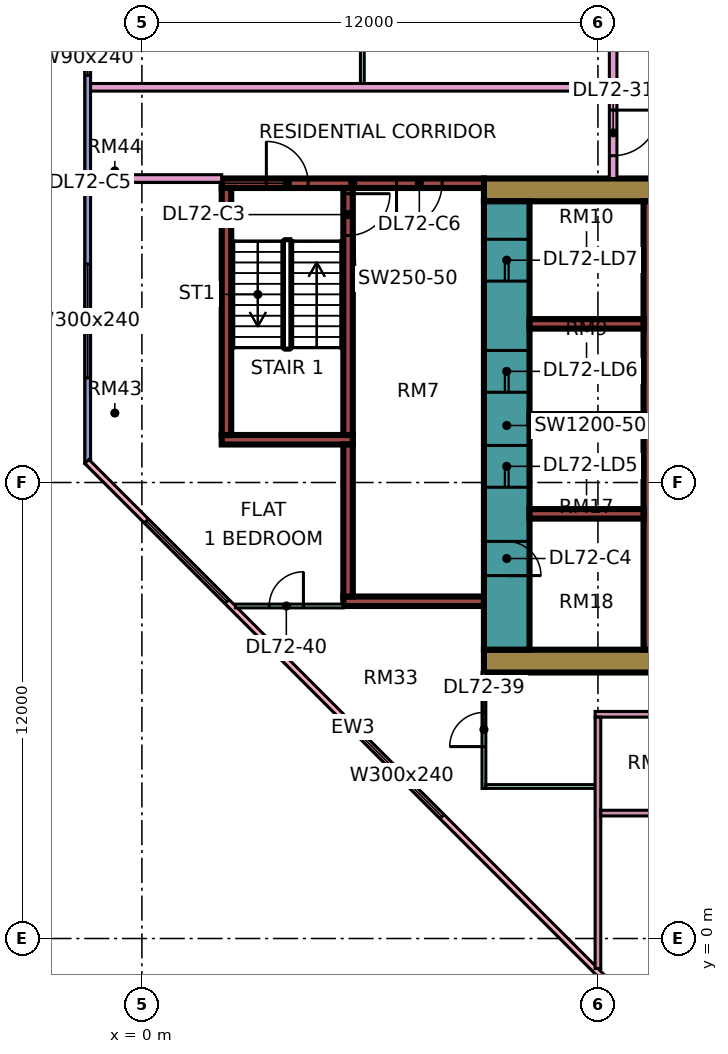
"""IFC4 building model, lengths in metres.
Left out: names, types, materials, properties, quantities, classifications, styles, units other than length and angle.
Written with IfcOpenShell. Run it as: python <this file> out.ifc"""

import sys

from ifc_helpers import new_model, si_unit, direction, frame, frame_2d, origin, place, context, subcontext, project, spatial, rectangle, extrude, element, fill, save


model = new_model("IFC4")
c1 = context("Model", 3, precision=1e-05, world=origin(), true_north=direction((0.0, 1.0)))
c2 = subcontext(c1, "Body", "Model", "MODEL_VIEW")
j1 = project(units=[si_unit("LENGTHUNIT", "METRE"), si_unit("PLANEANGLEUNIT", "RADIAN")], contexts=[c1])
p1 = place(None, origin())
s1 = spatial("IfcSite", under=j1, at=p1, CompositionType="ELEMENT")
p2 = place(p1, origin())
s2 = spatial("IfcBuilding", under=s1, at=p2, CompositionType="ELEMENT")
p3 = place(p2, frame((0.0, 0.0, 307.15)))
s3 = spatial("IfcBuildingStorey", under=s2, at=p3, CompositionType="ELEMENT", Elevation=307.15)
p4 = place(p3, frame((9.0, 7.3, 0.0), z_axis=(0.0, 0.0, 1.0), x_axis=(1.0, 0.0, 0.0)))
e1 = element("IfcWall", 1, at=p4, inside=s3, PredefinedType="SHEAR", context=c2, shape_type="SweptSolid", body=[
    extrude(rectangle(XDim=25.0, YDim=0.6, at=frame_2d((12.5, 0.0))), origin(), (0.0, 0.0, 1.0), 3.75),
])
p5 = place(p3, frame((9.0, 19.7, 0.0), z_axis=(0.0, 0.0, 1.0), x_axis=(1.0, 0.0, 0.0)))
e2 = element("IfcWall", 2, at=p5, inside=s3, PredefinedType="SHEAR", context=c2, shape_type="SweptSolid", body=[
    extrude(rectangle(XDim=25.0, YDim=0.6, at=frame_2d((12.5, 0.0))), origin(), (0.0, 0.0, 1.0), 3.75),
])
p6 = place(p5, frame((19.1, 0.0, 0.0)))
e3 = element("IfcOpeningElement", 3, at=p6, cuts=e2, PredefinedType="OPENING", context=c2, shape_type="SweptSolid", body=[
    extrude(rectangle(XDim=1.8, YDim=2.4, at=frame_2d((0.9, 1.2))), frame((0.0, 0.31, 0.0), z_axis=(0.0, -1.0, 0.0), x_axis=(1.0, 0.0, 0.0)), (0.0, 0.0, 1.0), 0.62),
])
p7 = place(p3, frame((9.6, 7.6, 0.0), z_axis=(0.0, 0.0, 1.0), x_axis=(0.0, 1.0, 0.0)))
e4 = element("IfcWall", 4, at=p7, inside=s3, PredefinedType="SHEAR", context=c2, shape_type="SweptSolid", body=[
    extrude(rectangle(XDim=11.8, YDim=1.2, at=frame_2d((5.9, 0.0))), origin(), (0.0, 0.0, 1.0), 3.75),
])
p8 = place(p7, frame((4.275, 0.0, 0.0)))
e5 = element("IfcOpeningElement", 5, at=p8, cuts=e4, PredefinedType="OPENING", context=c2, shape_type="SweptSolid", body=[
    extrude(rectangle(XDim=1.1, YDim=2.2, at=frame_2d((0.55, 1.1))), frame((0.0, 0.61, 0.0), z_axis=(0.0, -1.0, 0.0), x_axis=(1.0, 0.0, 0.0)), (0.0, 0.0, 1.0), 1.22),
])
p9 = place(p7, frame((6.775, 0.0, 0.0)))
e6 = element("IfcOpeningElement", 6, at=p9, cuts=e4, PredefinedType="OPENING", context=c2, shape_type="SweptSolid", body=[
    extrude(rectangle(XDim=1.1, YDim=2.2, at=frame_2d((0.55, 1.1))), frame((0.0, 0.61, 0.0), z_axis=(0.0, -1.0, 0.0), x_axis=(1.0, 0.0, 0.0)), (0.0, 0.0, 1.0), 1.22),
])
p10 = place(p7, frame((9.7, 0.0, 0.0)))
e7 = element("IfcOpeningElement", 7, at=p10, cuts=e4, PredefinedType="OPENING", context=c2, shape_type="SweptSolid", body=[
    extrude(rectangle(XDim=1.1, YDim=2.2, at=frame_2d((0.55, 1.1))), frame((0.0, 0.61, 0.0), z_axis=(0.0, -1.0, 0.0), x_axis=(1.0, 0.0, 0.0)), (0.0, 0.0, 1.0), 1.22),
])
p11 = place(p7, frame((1.95, 0.0, 0.0)))
e8 = element("IfcOpeningElement", 8, at=p11, cuts=e4, PredefinedType="OPENING", context=c2, shape_type="SweptSolid", body=[
    extrude(rectangle(XDim=0.9, YDim=2.1, at=frame_2d((0.45, 1.05))), frame((0.0, 0.61, 0.0), z_axis=(0.0, -1.0, 0.0), x_axis=(1.0, 0.0, 0.0)), (0.0, 0.0, 1.0), 1.22),
])
p12 = place(p3, frame((13.325, 7.6, 0.0), z_axis=(0.0, 0.0, 1.0), x_axis=(0.0, 1.0, 0.0)))
e9 = element("IfcWall", 9, at=p12, inside=s3, PredefinedType="SHEAR", context=c2, shape_type="SweptSolid", body=[
    extrude(rectangle(XDim=11.8, YDim=0.25, at=frame_2d((5.9, 0.0))), origin(), (0.0, 0.0, 1.0), 3.75),
])
for number, where, z_axis, x_axis in (
    (10, (10.2, 11.175, 0.0), (0.0, 0.0, 1.0), (1.0, 0.0, 0.0)),
    (11, (10.2, 13.675, 0.0), (0.0, 0.0, 1.0), (1.0, 0.0, 0.0)),
    (12, (10.2, 16.175, 0.0), (0.0, 0.0, 1.0), (1.0, 0.0, 0.0)),
):
    element("IfcWall", number, at=place(p3, frame(where, z_axis=z_axis, x_axis=x_axis)), inside=s3, PredefinedType="SHEAR", context=c2, shape_type="SweptSolid", body=[
        extrude(rectangle(XDim=3.0, YDim=0.25, at=frame_2d((1.5, 0.0))), origin(), (0.0, 0.0, 1.0), 3.75),
    ])
p13 = place(p3, frame((2.1, 19.875, 0.0), z_axis=(0.0, 0.0, 1.0), x_axis=(1.0, 0.0, 0.0)))
e13 = element("IfcWall", 13, at=p13, inside=s3, PredefinedType="SHEAR", context=c2, shape_type="SweptSolid", body=[
    extrude(rectangle(XDim=6.9, YDim=0.25, at=frame_2d((3.45, 0.0))), origin(), (0.0, 0.0, 1.0), 3.75),
])
p14 = place(p13, frame((1.175, 0.0, 0.0)))
e14 = element("IfcOpeningElement", 14, at=p14, cuts=e13, PredefinedType="OPENING", context=c2, shape_type="SweptSolid", body=[
    extrude(rectangle(XDim=1.1, YDim=2.2, at=frame_2d((0.55, 1.1))), frame((0.0, 0.135, 0.0), z_axis=(0.0, -1.0, 0.0), x_axis=(1.0, 0.0, 0.0)), (0.0, 0.0, 1.0), 0.27),
])
p15 = place(p13, frame((4.6, 0.0, 0.0)))
e15 = element("IfcOpeningElement", 15, at=p15, cuts=e13, PredefinedType="OPENING", context=c2, shape_type="SweptSolid", body=[
    extrude(rectangle(XDim=1.2, YDim=2.2, at=frame_2d((0.6, 1.1))), frame((0.0, 0.135, 0.0), z_axis=(0.0, -1.0, 0.0), x_axis=(1.0, 0.0, 0.0)), (0.0, 0.0, 1.0), 0.27),
])
p16 = place(p3, frame((2.1, 13.125, 0.0), z_axis=(0.0, 0.0, 1.0), x_axis=(1.0, 0.0, 0.0)))
e16 = element("IfcWall", 16, at=p16, inside=s3, PredefinedType="SHEAR", context=c2, shape_type="SweptSolid", body=[
    extrude(rectangle(XDim=3.45, YDim=0.25, at=frame_2d((1.725, 0.0))), origin(), (0.0, 0.0, 1.0), 3.75),
])
p17 = place(p3, frame((2.225, 13.25, 0.0), z_axis=(0.0, 0.0, 1.0), x_axis=(0.0, 1.0, 0.0)))
e17 = element("IfcWall", 17, at=p17, inside=s3, PredefinedType="SHEAR", context=c2, shape_type="SweptSolid", body=[
    extrude(rectangle(XDim=6.5, YDim=0.25, at=frame_2d((3.25, 0.0))), origin(), (0.0, 0.0, 1.0), 3.75),
])
p18 = place(p3, frame((5.425, 13.25, 0.0), z_axis=(0.0, 0.0, 1.0), x_axis=(0.0, 1.0, 0.0)))
e18 = element("IfcWall", 18, at=p18, inside=s3, PredefinedType="SHEAR", context=c2, shape_type="SweptSolid", body=[
    extrude(rectangle(XDim=6.5, YDim=0.25, at=frame_2d((3.25, 0.0))), origin(), (0.0, 0.0, 1.0), 3.75),
])
p19 = place(p18, frame((5.25, 0.0, 0.0)))
e19 = element("IfcOpeningElement", 19, at=p19, cuts=e18, PredefinedType="OPENING", context=c2, shape_type="SweptSolid", body=[
    extrude(rectangle(XDim=1.1, YDim=2.2, at=frame_2d((0.55, 1.1))), frame((0.0, 0.135, 0.0), z_axis=(0.0, -1.0, 0.0), x_axis=(1.0, 0.0, 0.0)), (0.0, 0.0, 1.0), 0.27),
])
p20 = place(p3, frame((5.3, 8.875, 0.0), z_axis=(0.0, 0.0, 1.0), x_axis=(1.0, 0.0, 0.0)))
e20 = element("IfcWall", 20, at=p20, inside=s3, PredefinedType="SHEAR", context=c2, shape_type="SweptSolid", body=[
    extrude(rectangle(XDim=3.7, YDim=0.25, at=frame_2d((1.85, 0.0))), origin(), (0.0, 0.0, 1.0), 3.75),
])
p21 = place(p3, frame((5.425, 9.0, 0.0), z_axis=(0.0, 0.0, 1.0), x_axis=(0.0, 1.0, 0.0)))
e21 = element("IfcWall", 21, at=p21, inside=s3, PredefinedType="SHEAR", context=c2, shape_type="SweptSolid", body=[
    extrude(rectangle(XDim=4.0, YDim=0.25, at=frame_2d((2.0, 0.0))), origin(), (0.0, 0.0, 1.0), 3.75),
])
p22 = place(p3, frame((-1.425, 23.925, 0.0), z_axis=(0.0, 0.0, 1.0), x_axis=(0.0, -1.0, 0.0)))
e22 = element("IfcWall", 22, at=p22, inside=s3, PredefinedType="SOLIDWALL", context=c2, shape_type="SweptSolid", body=[
    extrude(rectangle(XDim=11.425, YDim=0.15, at=frame_2d((5.712, 0.0))), origin(), (0.0, 0.0, 1.0), 3.35),
])
p23 = place(p22, frame((0.312, 0.0, 0.45)))
e23 = element("IfcOpeningElement", 23, at=p23, cuts=e22, PredefinedType="OPENING", context=c2, shape_type="SweptSolid", body=[
    extrude(rectangle(XDim=0.9, YDim=2.4, at=frame_2d((0.45, 1.2))), frame((0.0, 0.085, 0.0), z_axis=(0.0, -1.0, 0.0), x_axis=(1.0, 0.0, 0.0)), (0.0, 0.0, 1.0), 0.17),
])
p24 = place(p22, frame((6.175, 0.0, 0.45)))
e24 = element("IfcOpeningElement", 24, at=p24, cuts=e22, PredefinedType="OPENING", context=c2, shape_type="SweptSolid", body=[
    extrude(rectangle(XDim=3.0, YDim=2.4, at=frame_2d((1.5, 1.2))), frame((0.0, 0.085, 0.0), z_axis=(0.0, -1.0, 0.0), x_axis=(1.0, 0.0, 0.0)), (0.0, 0.0, 1.0), 0.17),
])
p25 = place(p3, frame((-1.447, 12.553, 0.0), z_axis=(0.0, 0.0, 1.0), x_axis=(0.707106781187, -0.707106781187, 0.0)))
e25 = element("IfcWall", 25, at=p25, inside=s3, PredefinedType="SOLIDWALL", context=c2, shape_type="SweptSolid", body=[
    extrude(rectangle(XDim=19.799, YDim=0.15, at=frame_2d((9.899, 0.0))), origin(), (0.0, 0.0, 1.0), 3.35),
])
p26 = place(p25, frame((2.212, 0.0, 0.45)))
e26 = element("IfcOpeningElement", 26, at=p26, cuts=e25, PredefinedType="OPENING", context=c2, shape_type="SweptSolid", body=[
    extrude(rectangle(XDim=3.0, YDim=2.4, at=frame_2d((1.5, 1.2))), frame((0.0, 0.085, 0.0), z_axis=(0.0, -1.0, 0.0), x_axis=(1.0, 0.0, 0.0)), (0.0, 0.0, 1.0), 0.17),
])
p27 = place(p25, frame((10.216, 0.0, 0.45)))
e27 = element("IfcOpeningElement", 27, at=p27, cuts=e25, PredefinedType="OPENING", context=c2, shape_type="SweptSolid", body=[
    extrude(rectangle(XDim=3.0, YDim=2.4, at=frame_2d((1.5, 1.2))), frame((0.0, 0.085, 0.0), z_axis=(0.0, -1.0, 0.0), x_axis=(1.0, 0.0, 0.0)), (0.0, 0.0, 1.0), 0.17),
])
p28 = place(p3, frame((-1.35, 20.0, 0.0), z_axis=(0.0, 0.0, 1.0), x_axis=(1.0, 0.0, 0.0)))
e28 = element("IfcWall", 28, at=p28, inside=s3, PredefinedType="PARTITIONING", context=c2, shape_type="SweptSolid", body=[
    extrude(rectangle(XDim=3.45, YDim=0.2, at=frame_2d((1.725, 0.0))), origin(), (0.0, 0.0, 1.0), 3.35),
])
p29 = place(p3, frame((-1.35, 22.4, 0.0), z_axis=(0.0, 0.0, 1.0), x_axis=(1.0, 0.0, 0.0)))
e29 = element("IfcWall", 29, at=p29, inside=s3, PredefinedType="PARTITIONING", context=c2, shape_type="SweptSolid", body=[
    extrude(rectangle(XDim=13.65, YDim=0.2, at=frame_2d((6.825, 0.0))), origin(), (0.0, 0.0, 1.0), 3.35),
])
p30 = place(p3, frame((2.461, 8.75, 0.0), z_axis=(0.0, 0.0, 1.0), x_axis=(1.0, 0.0, 0.0)))
e30 = element("IfcWall", 30, at=p30, inside=s3, PredefinedType="PARTITIONING", context=c2, shape_type="SweptSolid", body=[
    extrude(rectangle(XDim=2.839, YDim=0.1, at=frame_2d((1.419, 0.0))), origin(), (0.0, 0.0, 1.0), 3.35),
])
p31 = place(p30, frame((0.889, 0.0, 0.0)))
e31 = element("IfcOpeningElement", 31, at=p31, cuts=e30, PredefinedType="OPENING", context=c2, shape_type="SweptSolid", body=[
    extrude(rectangle(XDim=0.9, YDim=2.1, at=frame_2d((0.45, 1.05))), frame((0.0, 0.06, 0.0), z_axis=(0.0, -1.0, 0.0), x_axis=(1.0, 0.0, 0.0)), (0.0, 0.0, 1.0), 0.12),
])
p32 = place(p3, frame((5.8, 22.5, 0.0), z_axis=(0.0, 0.0, 1.0), x_axis=(0.0, 1.0, 0.0)))
e32 = element("IfcWall", 32, at=p32, inside=s3, PredefinedType="PARTITIONING", context=c2, shape_type="SweptSolid", body=[
    extrude(rectangle(XDim=4.45, YDim=0.1, at=frame_2d((2.225, 0.0))), origin(), (0.0, 0.0, 1.0), 3.35),
])
p33 = place(p3, frame((9.0, 3.95, 0.0), z_axis=(0.0, 0.0, 1.0), x_axis=(0.0, 1.0, 0.0)))
e33 = element("IfcWall", 33, at=p33, inside=s3, PredefinedType="PARTITIONING", context=c2, shape_type="SweptSolid", body=[
    extrude(rectangle(XDim=3.05, YDim=0.1, at=frame_2d((1.525, 0.0))), origin(), (0.0, 0.0, 1.0), 3.35),
])
p34 = place(p33, frame((1.1, 0.0, 0.0)))
e34 = element("IfcOpeningElement", 34, at=p34, cuts=e33, PredefinedType="OPENING", context=c2, shape_type="SweptSolid", body=[
    extrude(rectangle(XDim=0.9, YDim=2.1, at=frame_2d((0.45, 1.05))), frame((0.0, 0.06, 0.0), z_axis=(0.0, -1.0, 0.0), x_axis=(1.0, 0.0, 0.0)), (0.0, 0.0, 1.0), 0.12),
])
p35 = place(p3, frame((9.05, 4.0, 0.0), z_axis=(0.0, 0.0, 1.0), x_axis=(1.0, 0.0, 0.0)))
e35 = element("IfcWall", 35, at=p35, inside=s3, PredefinedType="PARTITIONING", context=c2, shape_type="SweptSolid", body=[
    extrude(rectangle(XDim=2.875, YDim=0.1, at=frame_2d((1.438, 0.0))), origin(), (0.0, 0.0, 1.0), 3.35),
])
p36 = place(p3, frame((11.925, 5.9, 0.0), z_axis=(0.0, 0.0, 1.0), x_axis=(1.0, 0.0, 0.0)))
e36 = element("IfcWall", 36, at=p36, inside=s3, PredefinedType="PARTITIONING", context=c2, shape_type="SweptSolid", body=[
    extrude(rectangle(XDim=21.125, YDim=0.15, at=frame_2d((10.562, 0.0))), origin(), (0.0, 0.0, 1.0), 3.35),
])
p37 = place(p36, frame((7.125, 0.0, 0.0)))
e37 = element("IfcOpeningElement", 37, at=p37, cuts=e36, PredefinedType="OPENING", context=c2, shape_type="SweptSolid", body=[
    extrude(rectangle(XDim=0.9, YDim=2.1, at=frame_2d((0.45, 1.05))), frame((0.0, 0.085, 0.0), z_axis=(0.0, -1.0, 0.0), x_axis=(1.0, 0.0, 0.0)), (0.0, 0.0, 1.0), 0.17),
])
p38 = place(p36, frame((10.125, 0.0, 0.0)))
e38 = element("IfcOpeningElement", 38, at=p38, cuts=e36, PredefinedType="OPENING", context=c2, shape_type="SweptSolid", body=[
    extrude(rectangle(XDim=0.9, YDim=2.1, at=frame_2d((0.45, 1.05))), frame((0.0, 0.085, 0.0), z_axis=(0.0, -1.0, 0.0), x_axis=(1.0, 0.0, 0.0)), (0.0, 0.0, 1.0), 0.17),
])
p39 = place(p36, frame((4.125, 0.0, 0.0)))
e39 = element("IfcOpeningElement", 39, at=p39, cuts=e36, PredefinedType="OPENING", context=c2, shape_type="SweptSolid", body=[
    extrude(rectangle(XDim=0.9, YDim=2.1, at=frame_2d((0.45, 1.05))), frame((0.0, 0.085, 0.0), z_axis=(0.0, -1.0, 0.0), x_axis=(1.0, 0.0, 0.0)), (0.0, 0.0, 1.0), 0.17),
])
p40 = place(p36, frame((16.125, 0.0, 0.0)))
e40 = element("IfcOpeningElement", 40, at=p40, cuts=e36, PredefinedType="OPENING", context=c2, shape_type="SweptSolid", body=[
    extrude(rectangle(XDim=0.9, YDim=2.1, at=frame_2d((0.45, 1.05))), frame((0.0, 0.085, 0.0), z_axis=(0.0, -1.0, 0.0), x_axis=(1.0, 0.0, 0.0)), (0.0, 0.0, 1.0), 0.17),
])
p41 = place(p3, frame((12.0, -0.788, 0.0), z_axis=(0.0, 0.0, 1.0), x_axis=(0.0, 1.0, 0.0)))
e41 = element("IfcWall", 41, at=p41, inside=s3, PredefinedType="PARTITIONING", context=c2, shape_type="SweptSolid", body=[
    extrude(rectangle(XDim=6.613, YDim=0.15, at=frame_2d((3.306, 0.0))), origin(), (0.0, 0.0, 1.0), 3.35),
])
p42 = place(p3, frame((12.075, 3.3, 0.0), z_axis=(0.0, 0.0, 1.0), x_axis=(1.0, 0.0, 0.0)))
e42 = element("IfcWall", 42, at=p42, inside=s3, PredefinedType="PARTITIONING", context=c2, shape_type="SweptSolid", body=[
    extrude(rectangle(XDim=3.0, YDim=0.15, at=frame_2d((1.5, 0.0))), origin(), (0.0, 0.0, 1.0), 3.35),
])
p43 = place(p3, frame((12.4, 20.0, 0.0), z_axis=(0.0, 0.0, 1.0), x_axis=(0.0, 1.0, 0.0)))
e43 = element("IfcWall", 43, at=p43, inside=s3, PredefinedType="PARTITIONING", context=c2, shape_type="SweptSolid", body=[
    extrude(rectangle(XDim=34.0, YDim=0.2, at=frame_2d((17.0, 0.0))), origin(), (0.0, 0.0, 1.0), 3.35),
])
p44 = place(p43, frame((19.8, 0.0, 0.0)))
e44 = element("IfcOpeningElement", 44, at=p44, cuts=e43, PredefinedType="OPENING", context=c2, shape_type="SweptSolid", body=[
    extrude(rectangle(XDim=1.0, YDim=2.1, at=frame_2d((0.5, 1.05))), frame((0.0, 0.11, 0.0), z_axis=(0.0, -1.0, 0.0), x_axis=(1.0, 0.0, 0.0)), (0.0, 0.0, 1.0), 0.22),
])
p45 = place(p43, frame((0.6, 0.0, 0.0)))
e45 = element("IfcOpeningElement", 45, at=p45, cuts=e43, PredefinedType="OPENING", context=c2, shape_type="SweptSolid", body=[
    extrude(rectangle(XDim=1.2, YDim=2.1, at=frame_2d((0.6, 1.05))), frame((0.0, 0.11, 0.0), z_axis=(0.0, -1.0, 0.0), x_axis=(1.0, 0.0, 0.0)), (0.0, 0.0, 1.0), 0.22),
])
p46 = place(p43, frame((4.5, 0.0, 0.0)))
e46 = element("IfcOpeningElement", 46, at=p46, cuts=e43, PredefinedType="OPENING", context=c2, shape_type="SweptSolid", body=[
    extrude(rectangle(XDim=1.0, YDim=2.1, at=frame_2d((0.5, 1.05))), frame((0.0, 0.11, 0.0), z_axis=(0.0, -1.0, 0.0), x_axis=(1.0, 0.0, 0.0)), (0.0, 0.0, 1.0), 0.22),
])
p47 = place(p23, origin())
e47 = element("IfcWindow", 47, at=p47, inside=s3, PartitioningType="SINGLE_PANEL", PredefinedType="WINDOW", context=c2, shape_type="SweptSolid", body=[
    extrude(rectangle(XDim=0.9, YDim=2.4, at=frame_2d((0.45, 1.2))), frame((0.0, 0.03, 0.0), z_axis=(0.0, -1.0, 0.0), x_axis=(1.0, 0.0, 0.0)), (0.0, 0.0, 1.0), 0.06),
])
fill(e23, e47)
p48 = place(p24, origin())
e48 = element("IfcWindow", 48, at=p48, inside=s3, PartitioningType="SINGLE_PANEL", PredefinedType="WINDOW", context=c2, shape_type="SweptSolid", body=[
    extrude(rectangle(XDim=3.0, YDim=2.4, at=frame_2d((1.5, 1.2))), frame((0.0, 0.03, 0.0), z_axis=(0.0, -1.0, 0.0), x_axis=(1.0, 0.0, 0.0)), (0.0, 0.0, 1.0), 0.06),
])
fill(e24, e48)
p49 = place(p26, origin())
e49 = element("IfcWindow", 49, at=p49, inside=s3, PartitioningType="SINGLE_PANEL", PredefinedType="WINDOW", context=c2, shape_type="SweptSolid", body=[
    extrude(rectangle(XDim=3.0, YDim=2.4, at=frame_2d((1.5, 1.2))), frame((0.0, 0.03, 0.0), z_axis=(0.0, -1.0, 0.0), x_axis=(1.0, 0.0, 0.0)), (0.0, 0.0, 1.0), 0.06),
])
fill(e26, e49)
p50 = place(p27, origin())
e50 = element("IfcWindow", 50, at=p50, inside=s3, PartitioningType="SINGLE_PANEL", PredefinedType="WINDOW", context=c2, shape_type="SweptSolid", body=[
    extrude(rectangle(XDim=3.0, YDim=2.4, at=frame_2d((1.5, 1.2))), frame((0.0, 0.03, 0.0), z_axis=(0.0, -1.0, 0.0), x_axis=(1.0, 0.0, 0.0)), (0.0, 0.0, 1.0), 0.06),
])
fill(e27, e50)
p51 = place(p8, origin())
e51 = element("IfcDoor", 51, at=p51, inside=s3, OperationType="DOUBLE_DOOR_SLIDING", PredefinedType="DOOR", context=c2, shape_type="SweptSolid", body=[
    extrude(rectangle(XDim=1.1, YDim=2.2, at=frame_2d((0.55, 1.1))), frame((0.0, 0.025, 0.0), z_axis=(0.0, -1.0, 0.0), x_axis=(1.0, 0.0, 0.0)), (0.0, 0.0, 1.0), 0.05),
])
fill(e5, e51)
p52 = place(p9, origin())
e52 = element("IfcDoor", 52, at=p52, inside=s3, OperationType="DOUBLE_DOOR_SLIDING", PredefinedType="DOOR", context=c2, shape_type="SweptSolid", body=[
    extrude(rectangle(XDim=1.1, YDim=2.2, at=frame_2d((0.55, 1.1))), frame((0.0, 0.025, 0.0), z_axis=(0.0, -1.0, 0.0), x_axis=(1.0, 0.0, 0.0)), (0.0, 0.0, 1.0), 0.05),
])
fill(e6, e52)
p53 = place(p10, origin())
e53 = element("IfcDoor", 53, at=p53, inside=s3, OperationType="DOUBLE_DOOR_SLIDING", PredefinedType="DOOR", context=c2, shape_type="SweptSolid", body=[
    extrude(rectangle(XDim=1.1, YDim=2.2, at=frame_2d((0.55, 1.1))), frame((0.0, 0.025, 0.0), z_axis=(0.0, -1.0, 0.0), x_axis=(1.0, 0.0, 0.0)), (0.0, 0.0, 1.0), 0.05),
])
fill(e7, e53)
p54 = place(p19, origin())
e54 = element("IfcDoor", 54, at=p54, inside=s3, OperationType="SINGLE_SWING_RIGHT", PredefinedType="DOOR", context=c2, shape_type="SweptSolid", body=[
    extrude(rectangle(XDim=1.1, YDim=2.2, at=frame_2d((0.55, 1.1))), frame((0.0, 0.025, 0.0), z_axis=(0.0, -1.0, 0.0), x_axis=(1.0, 0.0, 0.0)), (0.0, 0.0, 1.0), 0.05),
])
fill(e19, e54)
p55 = place(p11, frame((0.9, 0.0, 0.0), z_axis=(0.0, 0.0, 1.0), x_axis=(-1.0, 0.0, 0.0)))
e55 = element("IfcDoor", 55, at=p55, inside=s3, OperationType="SINGLE_SWING_LEFT", PredefinedType="DOOR", context=c2, shape_type="SweptSolid", body=[
    extrude(rectangle(XDim=0.9, YDim=2.1, at=frame_2d((0.45, 1.05))), frame((0.0, 0.025, 0.0), z_axis=(0.0, -1.0, 0.0), x_axis=(1.0, 0.0, 0.0)), (0.0, 0.0, 1.0), 0.05),
])
fill(e8, e55)
p56 = place(p14, origin())
e56 = element("IfcDoor", 56, at=p56, inside=s3, OperationType="SINGLE_SWING_LEFT", PredefinedType="DOOR", context=c2, shape_type="SweptSolid", body=[
    extrude(rectangle(XDim=1.1, YDim=2.2, at=frame_2d((0.55, 1.1))), frame((0.0, 0.025, 0.0), z_axis=(0.0, -1.0, 0.0), x_axis=(1.0, 0.0, 0.0)), (0.0, 0.0, 1.0), 0.05),
])
fill(e14, e56)
p57 = place(p15, frame((1.2, 0.0, 0.0), z_axis=(0.0, 0.0, 1.0), x_axis=(-1.0, 0.0, 0.0)))
e57 = element("IfcDoor", 57, at=p57, inside=s3, OperationType="SINGLE_SWING_LEFT", PredefinedType="DOOR", context=c2, shape_type="SweptSolid", body=[
    extrude(rectangle(XDim=1.2, YDim=2.2, at=frame_2d((0.6, 1.1))), frame((0.0, 0.025, 0.0), z_axis=(0.0, -1.0, 0.0), x_axis=(1.0, 0.0, 0.0)), (0.0, 0.0, 1.0), 0.05),
])
fill(e15, e57)
p58 = place(p45, origin())
e58 = element("IfcDoor", 58, at=p58, inside=s3, OperationType="SINGLE_SWING_RIGHT", PredefinedType="DOOR", context=c2, shape_type="SweptSolid", body=[
    extrude(rectangle(XDim=1.2, YDim=2.1, at=frame_2d((0.6, 1.05))), frame((0.0, 0.025, 0.0), z_axis=(0.0, -1.0, 0.0), x_axis=(1.0, 0.0, 0.0)), (0.0, 0.0, 1.0), 0.05),
])
fill(e45, e58)
p59 = place(p34, origin())
e59 = element("IfcDoor", 59, at=p59, inside=s3, OperationType="SINGLE_SWING_LEFT", PredefinedType="DOOR", context=c2, shape_type="SweptSolid", body=[
    extrude(rectangle(XDim=0.9, YDim=2.1, at=frame_2d((0.45, 1.05))), frame((0.0, 0.025, 0.0), z_axis=(0.0, -1.0, 0.0), x_axis=(1.0, 0.0, 0.0)), (0.0, 0.0, 1.0), 0.05),
])
fill(e34, e59)
p60 = place(p31, frame((0.9, 0.0, 0.0), z_axis=(0.0, 0.0, 1.0), x_axis=(-1.0, 0.0, 0.0)))
e60 = element("IfcDoor", 60, at=p60, inside=s3, OperationType="SINGLE_SWING_RIGHT", PredefinedType="DOOR", context=c2, shape_type="SweptSolid", body=[
    extrude(rectangle(XDim=0.9, YDim=2.1, at=frame_2d((0.45, 1.05))), frame((0.0, 0.025, 0.0), z_axis=(0.0, -1.0, 0.0), x_axis=(1.0, 0.0, 0.0)), (0.0, 0.0, 1.0), 0.05),
])
fill(e31, e60)
save(model, sys.argv[1])
